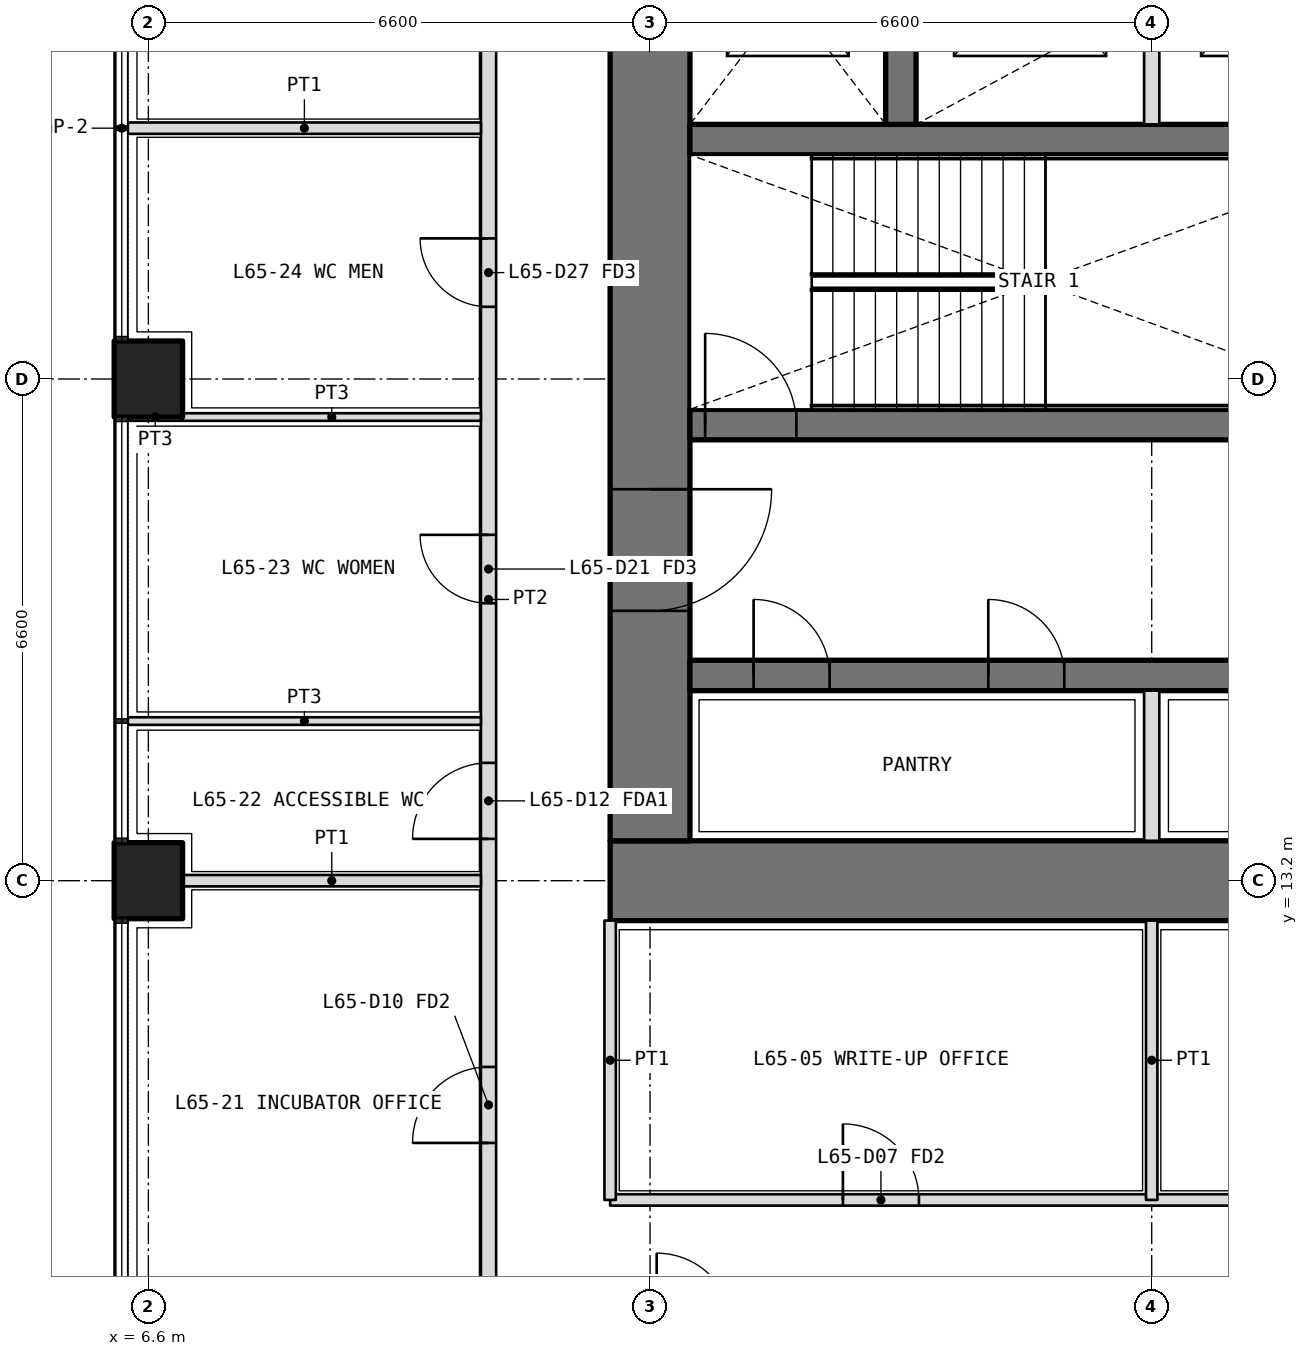
"""IFC4 building model, lengths in metres.
Left out: names, types, materials, properties, quantities, classifications, styles, units other than length and angle.
Written with IfcOpenShell. Run it as: python <this file> out.ifc"""

import sys

from ifc_helpers import new_model, si_unit, direction, frame, frame_2d, origin, origin_2d, place, context, subcontext, project, spatial, rectangle, extrude, element, fill, save


model = new_model("IFC4")
c1 = context("Model", 3, precision=1e-05, world=origin(), true_north=direction((0.0, 1.0)))
c2 = subcontext(c1, "Body", "Model", "MODEL_VIEW")
j1 = project(units=[si_unit("LENGTHUNIT", "METRE"), si_unit("PLANEANGLEUNIT", "RADIAN")], contexts=[c1])
p1 = place(None, origin())
s1 = spatial("IfcSite", under=j1, at=p1, CompositionType="ELEMENT")
p2 = place(p1, origin())
s2 = spatial("IfcBuilding", under=s1, at=p2, CompositionType="ELEMENT")
p3 = place(p2, frame((0.0, 0.0, 283.8)))
s3 = spatial("IfcBuildingStorey", under=s2, at=p3, CompositionType="ELEMENT", Elevation=283.8)
for number, where, z_axis, x_axis in (
    (1, (6.6, 13.2, 0.0), (0.0, 0.0, 1.0), (0.0, 1.0, 0.0)),
    (2, (6.6, 19.8, 0.0), (0.0, 0.0, 1.0), (0.0, 1.0, 0.0)),
):
    element("IfcColumn", number, at=place(p3, frame(where, z_axis=z_axis, x_axis=x_axis)), inside=s3, PredefinedType="COLUMN", context=c2, shape_type="SweptSolid", body=[
        extrude(rectangle(XDim=1.0, YDim=0.9, at=origin_2d()), origin(), (0.0, 0.0, 1.0), 4.2),
    ])
p4 = place(p3, frame((12.675, 13.2, 0.0), z_axis=(0.0, 0.0, 1.0), x_axis=(1.0, 0.0, 0.0)))
e3 = element("IfcWall", 3, at=p4, inside=s3, PredefinedType="SHEAR", context=c2, shape_type="SweptSolid", body=[
    extrude(rectangle(XDim=27.45, YDim=1.05, at=frame_2d((13.725, 0.0))), origin(), (0.0, 0.0, 1.0), 4.2),
])
p5 = place(p3, frame((13.2, 32.475, 0.0), z_axis=(0.0, 0.0, 1.0), x_axis=(0.0, -1.0, 0.0)))
e4 = element("IfcWall", 4, at=p5, inside=s3, PredefinedType="SHEAR", context=c2, shape_type="SweptSolid", body=[
    extrude(rectangle(XDim=18.75, YDim=1.05, at=frame_2d((9.375, 0.0))), origin(), (0.0, 0.0, 1.0), 4.2),
])
p6 = place(p5, frame((14.125, 0.0, 0.0)))
e5 = element("IfcOpeningElement", 5, at=p6, cuts=e4, PredefinedType="OPENING", context=c2, shape_type="SweptSolid", body=[
    extrude(rectangle(XDim=1.6, YDim=2.1, at=frame_2d((0.8, 1.05))), frame((0.0, 0.535, 0.0), z_axis=(0.0, -1.0, 0.0), x_axis=(1.0, 0.0, 0.0)), (0.0, 0.0, 1.0), 1.07),
])
p7 = place(p5, frame((3.325, 0.0, 0.0)))
e6 = element("IfcOpeningElement", 6, at=p7, cuts=e4, PredefinedType="OPENING", context=c2, shape_type="SweptSolid", body=[
    extrude(rectangle(XDim=1.6, YDim=2.1, at=frame_2d((0.8, 1.05))), frame((0.0, 0.535, 0.0), z_axis=(0.0, -1.0, 0.0), x_axis=(1.0, 0.0, 0.0)), (0.0, 0.0, 1.0), 1.07),
])
p8 = place(p3, frame((13.725, 15.9, 0.0), z_axis=(0.0, 0.0, 1.0), x_axis=(1.0, 0.0, 0.0)))
e7 = element("IfcWall", 7, at=p8, inside=s3, PredefinedType="SHEAR", context=c2, shape_type="SweptSolid", body=[
    extrude(rectangle(XDim=25.35, YDim=0.4, at=frame_2d((12.675, 0.0))), origin(), (0.0, 0.0, 1.0), 4.2),
])
p9 = place(p8, frame((0.837, 0.0, 0.0)))
e8 = element("IfcOpeningElement", 8, at=p9, cuts=e7, PredefinedType="OPENING", context=c2, shape_type="SweptSolid", body=[
    extrude(rectangle(XDim=1.0, YDim=2.1, at=frame_2d((0.5, 1.05))), frame((0.0, 0.21, 0.0), z_axis=(0.0, -1.0, 0.0), x_axis=(1.0, 0.0, 0.0)), (0.0, 0.0, 1.0), 0.42),
])
p10 = place(p8, frame((3.925, 0.0, 0.0)))
e9 = element("IfcOpeningElement", 9, at=p10, cuts=e7, PredefinedType="OPENING", context=c2, shape_type="SweptSolid", body=[
    extrude(rectangle(XDim=1.0, YDim=2.1, at=frame_2d((0.5, 1.05))), frame((0.0, 0.21, 0.0), z_axis=(0.0, -1.0, 0.0), x_axis=(1.0, 0.0, 0.0)), (0.0, 0.0, 1.0), 0.42),
])
p11 = place(p8, frame((7.225, 0.0, 0.0)))
e10 = element("IfcOpeningElement", 10, at=p11, cuts=e7, PredefinedType="OPENING", context=c2, shape_type="SweptSolid", body=[
    extrude(rectangle(XDim=1.0, YDim=2.1, at=frame_2d((0.5, 1.05))), frame((0.0, 0.21, 0.0), z_axis=(0.0, -1.0, 0.0), x_axis=(1.0, 0.0, 0.0)), (0.0, 0.0, 1.0), 0.42),
])
p12 = place(p8, frame((10.525, 0.0, 0.0)))
e11 = element("IfcOpeningElement", 11, at=p12, cuts=e7, PredefinedType="OPENING", context=c2, shape_type="SweptSolid", body=[
    extrude(rectangle(XDim=1.0, YDim=2.1, at=frame_2d((0.5, 1.05))), frame((0.0, 0.21, 0.0), z_axis=(0.0, -1.0, 0.0), x_axis=(1.0, 0.0, 0.0)), (0.0, 0.0, 1.0), 0.42),
])
p13 = place(p8, frame((13.825, 0.0, 0.0)))
e12 = element("IfcOpeningElement", 12, at=p13, cuts=e7, PredefinedType="OPENING", context=c2, shape_type="SweptSolid", body=[
    extrude(rectangle(XDim=1.0, YDim=2.1, at=frame_2d((0.5, 1.05))), frame((0.0, 0.21, 0.0), z_axis=(0.0, -1.0, 0.0), x_axis=(1.0, 0.0, 0.0)), (0.0, 0.0, 1.0), 0.42),
])
p14 = place(p8, frame((17.125, 0.0, 0.0)))
e13 = element("IfcOpeningElement", 13, at=p14, cuts=e7, PredefinedType="OPENING", context=c2, shape_type="SweptSolid", body=[
    extrude(rectangle(XDim=1.0, YDim=2.1, at=frame_2d((0.5, 1.05))), frame((0.0, 0.21, 0.0), z_axis=(0.0, -1.0, 0.0), x_axis=(1.0, 0.0, 0.0)), (0.0, 0.0, 1.0), 0.42),
])
p15 = place(p8, frame((20.425, 0.0, 0.0)))
e14 = element("IfcOpeningElement", 14, at=p15, cuts=e7, PredefinedType="OPENING", context=c2, shape_type="SweptSolid", body=[
    extrude(rectangle(XDim=1.0, YDim=2.1, at=frame_2d((0.5, 1.05))), frame((0.0, 0.21, 0.0), z_axis=(0.0, -1.0, 0.0), x_axis=(1.0, 0.0, 0.0)), (0.0, 0.0, 1.0), 0.42),
])
p16 = place(p8, frame((23.512, 0.0, 0.0)))
e15 = element("IfcOpeningElement", 15, at=p16, cuts=e7, PredefinedType="OPENING", context=c2, shape_type="SweptSolid", body=[
    extrude(rectangle(XDim=1.0, YDim=2.1, at=frame_2d((0.5, 1.05))), frame((0.0, 0.21, 0.0), z_axis=(0.0, -1.0, 0.0), x_axis=(1.0, 0.0, 0.0)), (0.0, 0.0, 1.0), 0.42),
])
p17 = place(p3, frame((13.725, 19.2, 0.0), z_axis=(0.0, 0.0, 1.0), x_axis=(1.0, 0.0, 0.0)))
e16 = element("IfcWall", 16, at=p17, inside=s3, PredefinedType="SHEAR", context=c2, shape_type="SweptSolid", body=[
    extrude(rectangle(XDim=25.35, YDim=0.4, at=frame_2d((12.675, 0.0))), origin(), (0.0, 0.0, 1.0), 4.2),
])
p18 = place(p17, frame((10.575, 0.0, 0.0)))
e17 = element("IfcOpeningElement", 17, at=p18, cuts=e16, PredefinedType="OPENING", context=c2, shape_type="SweptSolid", body=[
    extrude(rectangle(XDim=0.9, YDim=2.1, at=frame_2d((0.45, 1.05))), frame((0.0, 0.21, 0.0), z_axis=(0.0, -1.0, 0.0), x_axis=(1.0, 0.0, 0.0)), (0.0, 0.0, 1.0), 0.42),
])
p19 = place(p17, frame((13.875, 0.0, 0.0)))
e18 = element("IfcOpeningElement", 18, at=p19, cuts=e16, PredefinedType="OPENING", context=c2, shape_type="SweptSolid", body=[
    extrude(rectangle(XDim=0.9, YDim=2.1, at=frame_2d((0.45, 1.05))), frame((0.0, 0.21, 0.0), z_axis=(0.0, -1.0, 0.0), x_axis=(1.0, 0.0, 0.0)), (0.0, 0.0, 1.0), 0.42),
])
p20 = place(p17, frame((0.2, 0.0, 0.0)))
e19 = element("IfcOpeningElement", 19, at=p20, cuts=e16, PredefinedType="OPENING", context=c2, shape_type="SweptSolid", body=[
    extrude(rectangle(XDim=1.2, YDim=2.1, at=frame_2d((0.6, 1.05))), frame((0.0, 0.21, 0.0), z_axis=(0.0, -1.0, 0.0), x_axis=(1.0, 0.0, 0.0)), (0.0, 0.0, 1.0), 0.42),
])
p21 = place(p17, frame((23.512, 0.0, 0.0)))
e20 = element("IfcOpeningElement", 20, at=p21, cuts=e16, PredefinedType="OPENING", context=c2, shape_type="SweptSolid", body=[
    extrude(rectangle(XDim=1.1, YDim=2.1, at=frame_2d((0.55, 1.05))), frame((0.0, 0.21, 0.0), z_axis=(0.0, -1.0, 0.0), x_axis=(1.0, 0.0, 0.0)), (0.0, 0.0, 1.0), 0.42),
])
p22 = place(p17, frame((17.125, 0.0, 0.0)))
e21 = element("IfcOpeningElement", 21, at=p22, cuts=e16, PredefinedType="OPENING", context=c2, shape_type="SweptSolid", body=[
    extrude(rectangle(XDim=1.1, YDim=2.1, at=frame_2d((0.55, 1.05))), frame((0.0, 0.21, 0.0), z_axis=(0.0, -1.0, 0.0), x_axis=(1.0, 0.0, 0.0)), (0.0, 0.0, 1.0), 0.42),
])
p23 = place(p17, frame((20.325, 0.0, 0.0)))
e22 = element("IfcOpeningElement", 22, at=p23, cuts=e16, PredefinedType="OPENING", context=c2, shape_type="SweptSolid", body=[
    extrude(rectangle(XDim=1.1, YDim=2.1, at=frame_2d((0.55, 1.05))), frame((0.0, 0.21, 0.0), z_axis=(0.0, -1.0, 0.0), x_axis=(1.0, 0.0, 0.0)), (0.0, 0.0, 1.0), 0.42),
])
p24 = place(p3, frame((13.725, 22.95, 0.0), z_axis=(0.0, 0.0, 1.0), x_axis=(1.0, 0.0, 0.0)))
e23 = element("IfcWall", 23, at=p24, inside=s3, PredefinedType="SHEAR", context=c2, shape_type="SweptSolid", body=[
    extrude(rectangle(XDim=25.35, YDim=0.4, at=frame_2d((12.675, 0.0))), origin(), (0.0, 0.0, 1.0), 4.2),
])
p25 = place(p3, frame((16.5, 23.15, 0.0), z_axis=(0.0, 0.0, 1.0), x_axis=(0.0, 1.0, 0.0)))
e24 = element("IfcWall", 24, at=p25, inside=s3, PredefinedType="SHEAR", context=c2, shape_type="SweptSolid", body=[
    extrude(rectangle(XDim=3.35, YDim=0.4, at=frame_2d((1.675, 0.0))), origin(), (0.0, 0.0, 1.0), 4.2),
])
p26 = place(p3, frame((19.8, 13.725, 0.0), z_axis=(0.0, 0.0, 1.0), x_axis=(0.0, 1.0, 0.0)))
e25 = element("IfcWall", 25, at=p26, inside=s3, PredefinedType="PARTITIONING", context=c2, shape_type="SweptSolid", body=[
    extrude(rectangle(XDim=1.975, YDim=0.2, at=frame_2d((0.987, 0.0))), origin(), (0.0, 0.0, 1.0), 4.2),
])
p27 = place(p3, frame((19.8, 23.15, 0.0), z_axis=(0.0, 0.0, 1.0), x_axis=(0.0, 1.0, 0.0)))
e26 = element("IfcWall", 26, at=p27, inside=s3, PredefinedType="PARTITIONING", context=c2, shape_type="SweptSolid", body=[
    extrude(rectangle(XDim=3.35, YDim=0.2, at=frame_2d((1.675, 0.0))), origin(), (0.0, 0.0, 1.0), 4.2),
])
p28 = place(p3, frame((12.675, 9.0, 0.0), z_axis=(0.0, 0.0, 1.0), x_axis=(1.0, 0.0, 0.0)))
e27 = element("IfcWall", 27, at=p28, inside=s3, PredefinedType="PARTITIONING", context=c2, shape_type="SweptSolid", body=[
    extrude(rectangle(XDim=27.45, YDim=0.15, at=frame_2d((13.725, 0.0))), origin(), (0.0, 0.0, 1.0), 3.0),
])
p29 = place(p28, frame((3.062, 0.0, 0.0)))
e28 = element("IfcOpeningElement", 28, at=p29, cuts=e27, PredefinedType="OPENING", context=c2, shape_type="SweptSolid", body=[
    extrude(rectangle(XDim=1.0, YDim=2.1, at=frame_2d((0.5, 1.05))), frame((0.0, 0.085, 0.0), z_axis=(0.0, -1.0, 0.0), x_axis=(1.0, 0.0, 0.0)), (0.0, 0.0, 1.0), 0.17),
])
p30 = place(p28, frame((13.225, 0.0, 0.0)))
e29 = element("IfcOpeningElement", 29, at=p30, cuts=e27, PredefinedType="OPENING", context=c2, shape_type="SweptSolid", body=[
    extrude(rectangle(XDim=1.0, YDim=2.1, at=frame_2d((0.5, 1.05))), frame((0.0, 0.085, 0.0), z_axis=(0.0, -1.0, 0.0), x_axis=(1.0, 0.0, 0.0)), (0.0, 0.0, 1.0), 0.17),
])
p31 = place(p28, frame((23.387, 0.0, 0.0)))
e30 = element("IfcOpeningElement", 30, at=p31, cuts=e27, PredefinedType="OPENING", context=c2, shape_type="SweptSolid", body=[
    extrude(rectangle(XDim=1.0, YDim=2.1, at=frame_2d((0.5, 1.05))), frame((0.0, 0.085, 0.0), z_axis=(0.0, -1.0, 0.0), x_axis=(1.0, 0.0, 0.0)), (0.0, 0.0, 1.0), 0.17),
])
for number, where, z_axis, x_axis in (
    (31, (12.675, 12.675, 0.0), (0.0, 0.0, 1.0), (0.0, -1.0, 0.0)),
    (32, (19.8, 12.675, 0.0), (0.0, 0.0, 1.0), (0.0, -1.0, 0.0)),
):
    element("IfcWall", number, at=place(p3, frame(where, z_axis=z_axis, x_axis=x_axis)), inside=s3, PredefinedType="PARTITIONING", context=c2, shape_type="SweptSolid", body=[
        extrude(rectangle(XDim=3.675, YDim=0.15, at=frame_2d((1.837, 0.0))), origin(), (0.0, 0.0, 1.0), 3.0),
    ])
p32 = place(p3, frame((11.075, 7.4, 0.0), z_axis=(0.0, 0.0, 1.0), x_axis=(0.0, 1.0, 0.0)))
e33 = element("IfcWall", 33, at=p32, inside=s3, PredefinedType="PARTITIONING", context=c2, shape_type="SweptSolid", body=[
    extrude(rectangle(XDim=19.0, YDim=0.2, at=frame_2d((9.5, 0.0))), origin(), (0.0, 0.0, 1.0), 3.0),
])
p33 = place(p32, frame((2.35, 0.0, 0.0)))
e34 = element("IfcOpeningElement", 34, at=p33, cuts=e33, PredefinedType="OPENING", context=c2, shape_type="SweptSolid", body=[
    extrude(rectangle(XDim=1.0, YDim=2.1, at=frame_2d((0.5, 1.05))), frame((0.0, 0.11, 0.0), z_axis=(0.0, -1.0, 0.0), x_axis=(1.0, 0.0, 0.0)), (0.0, 0.0, 1.0), 0.22),
])
p34 = place(p32, frame((6.35, 0.0, 0.0)))
e35 = element("IfcOpeningElement", 35, at=p34, cuts=e33, PredefinedType="OPENING", context=c2, shape_type="SweptSolid", body=[
    extrude(rectangle(XDim=1.0, YDim=2.1, at=frame_2d((0.5, 1.05))), frame((0.0, 0.11, 0.0), z_axis=(0.0, -1.0, 0.0), x_axis=(1.0, 0.0, 0.0)), (0.0, 0.0, 1.0), 0.22),
])
p35 = place(p32, frame((9.45, 0.0, 0.0)))
e36 = element("IfcOpeningElement", 36, at=p35, cuts=e33, PredefinedType="OPENING", context=c2, shape_type="SweptSolid", body=[
    extrude(rectangle(XDim=0.9, YDim=2.1, at=frame_2d((0.45, 1.05))), frame((0.0, 0.11, 0.0), z_axis=(0.0, -1.0, 0.0), x_axis=(1.0, 0.0, 0.0)), (0.0, 0.0, 1.0), 0.22),
])
p36 = place(p32, frame((13.35, 0.0, 0.0)))
e37 = element("IfcOpeningElement", 37, at=p36, cuts=e33, PredefinedType="OPENING", context=c2, shape_type="SweptSolid", body=[
    extrude(rectangle(XDim=0.9, YDim=2.1, at=frame_2d((0.45, 1.05))), frame((0.0, 0.11, 0.0), z_axis=(0.0, -1.0, 0.0), x_axis=(1.0, 0.0, 0.0)), (0.0, 0.0, 1.0), 0.22),
])
p37 = place(p32, frame((16.85, 0.0, 0.0)))
e38 = element("IfcOpeningElement", 38, at=p37, cuts=e33, PredefinedType="OPENING", context=c2, shape_type="SweptSolid", body=[
    extrude(rectangle(XDim=1.0, YDim=2.1, at=frame_2d((0.5, 1.05))), frame((0.0, 0.11, 0.0), z_axis=(0.0, -1.0, 0.0), x_axis=(1.0, 0.0, 0.0)), (0.0, 0.0, 1.0), 0.22),
])
p38 = place(p3, frame((6.33, 15.3, 0.0), z_axis=(0.0, 0.0, 1.0), x_axis=(1.0, 0.0, 0.0)))
e39 = element("IfcWall", 39, at=p38, inside=s3, PredefinedType="PARTITIONING", context=c2, shape_type="SweptSolid", body=[
    extrude(rectangle(XDim=4.645, YDim=0.1, at=frame_2d((2.323, 0.0))), origin(), (0.0, 0.0, 1.0), 2.7),
])
p39 = place(p3, frame((6.33, 19.3, 0.0), z_axis=(0.0, 0.0, 1.0), x_axis=(1.0, 0.0, 0.0)))
e40 = element("IfcWall", 40, at=p39, inside=s3, PredefinedType="PARTITIONING", context=c2, shape_type="SweptSolid", body=[
    extrude(rectangle(XDim=0.72, YDim=0.1, at=frame_2d((0.36, 0.0))), origin(), (0.0, 0.0, 1.0), 2.7),
])
p40 = place(p3, frame((7.05, 19.3, 0.0), z_axis=(0.0, 0.0, 1.0), x_axis=(1.0, 0.0, 0.0)))
e41 = element("IfcWall", 41, at=p40, inside=s3, PredefinedType="PARTITIONING", context=c2, shape_type="SweptSolid", body=[
    extrude(rectangle(XDim=3.925, YDim=0.1, at=frame_2d((1.962, 0.0))), origin(), (0.0, 0.0, 1.0), 3.0),
])
p41 = place(p3, frame((6.33, 23.1, 0.0), z_axis=(0.0, 0.0, 1.0), x_axis=(1.0, 0.0, 0.0)))
e42 = element("IfcWall", 42, at=p41, inside=s3, PredefinedType="PARTITIONING", context=c2, shape_type="SweptSolid", body=[
    extrude(rectangle(XDim=4.645, YDim=0.15, at=frame_2d((2.323, 0.0))), origin(), (0.0, 0.0, 1.0), 2.7),
])
p42 = place(p3, frame((7.05, 13.2, 0.0), z_axis=(0.0, 0.0, 1.0), x_axis=(1.0, 0.0, 0.0)))
e43 = element("IfcWall", 43, at=p42, inside=s3, PredefinedType="PARTITIONING", context=c2, shape_type="SweptSolid", body=[
    extrude(rectangle(XDim=3.925, YDim=0.15, at=frame_2d((1.962, 0.0))), origin(), (0.0, 0.0, 1.0), 3.0),
])
p43 = place(p29, origin())
e44 = element("IfcDoor", 44, at=p43, inside=s3, OperationType="SINGLE_SWING_LEFT", PredefinedType="DOOR", context=c2, shape_type="SweptSolid", body=[
    extrude(rectangle(XDim=1.0, YDim=2.1, at=frame_2d((0.5, 1.05))), frame((0.0, 0.025, 0.0), z_axis=(0.0, -1.0, 0.0), x_axis=(1.0, 0.0, 0.0)), (0.0, 0.0, 1.0), 0.05),
])
fill(e28, e44)
p44 = place(p33, origin())
e45 = element("IfcDoor", 45, at=p44, inside=s3, OperationType="SINGLE_SWING_LEFT", PredefinedType="DOOR", context=c2, shape_type="SweptSolid", body=[
    extrude(rectangle(XDim=1.0, YDim=2.1, at=frame_2d((0.5, 1.05))), frame((0.0, 0.025, 0.0), z_axis=(0.0, -1.0, 0.0), x_axis=(1.0, 0.0, 0.0)), (0.0, 0.0, 1.0), 0.05),
])
fill(e34, e45)
p45 = place(p34, origin())
e46 = element("IfcDoor", 46, at=p45, inside=s3, OperationType="SINGLE_SWING_LEFT", PredefinedType="DOOR", context=c2, shape_type="SweptSolid", body=[
    extrude(rectangle(XDim=1.0, YDim=2.1, at=frame_2d((0.5, 1.05))), frame((0.0, 0.025, 0.0), z_axis=(0.0, -1.0, 0.0), x_axis=(1.0, 0.0, 0.0)), (0.0, 0.0, 1.0), 0.05),
])
fill(e35, e46)
p46 = place(p35, origin())
e47 = element("IfcDoor", 47, at=p46, inside=s3, OperationType="SINGLE_SWING_RIGHT", PredefinedType="DOOR", context=c2, shape_type="SweptSolid", body=[
    extrude(rectangle(XDim=0.9, YDim=2.1, at=frame_2d((0.45, 1.05))), frame((0.0, 0.025, 0.0), z_axis=(0.0, -1.0, 0.0), x_axis=(1.0, 0.0, 0.0)), (0.0, 0.0, 1.0), 0.05),
])
fill(e36, e47)
p47 = place(p36, origin())
e48 = element("IfcDoor", 48, at=p47, inside=s3, OperationType="SINGLE_SWING_RIGHT", PredefinedType="DOOR", context=c2, shape_type="SweptSolid", body=[
    extrude(rectangle(XDim=0.9, YDim=2.1, at=frame_2d((0.45, 1.05))), frame((0.0, 0.025, 0.0), z_axis=(0.0, -1.0, 0.0), x_axis=(1.0, 0.0, 0.0)), (0.0, 0.0, 1.0), 0.05),
])
fill(e37, e48)
p48 = place(p9, origin())
e49 = element("IfcDoor", 49, at=p48, inside=s3, OperationType="SINGLE_SWING_LEFT", PredefinedType="DOOR", context=c2, shape_type="SweptSolid", body=[
    extrude(rectangle(XDim=1.0, YDim=2.1, at=frame_2d((0.5, 1.05))), frame((0.0, 0.025, 0.0), z_axis=(0.0, -1.0, 0.0), x_axis=(1.0, 0.0, 0.0)), (0.0, 0.0, 1.0), 0.05),
])
fill(e8, e49)
p49 = place(p10, origin())
e50 = element("IfcDoor", 50, at=p49, inside=s3, OperationType="SINGLE_SWING_LEFT", PredefinedType="DOOR", context=c2, shape_type="SweptSolid", body=[
    extrude(rectangle(XDim=1.0, YDim=2.1, at=frame_2d((0.5, 1.05))), frame((0.0, 0.025, 0.0), z_axis=(0.0, -1.0, 0.0), x_axis=(1.0, 0.0, 0.0)), (0.0, 0.0, 1.0), 0.05),
])
fill(e9, e50)
p50 = place(p20, origin())
e51 = element("IfcDoor", 51, at=p50, inside=s3, OperationType="SINGLE_SWING_LEFT", PredefinedType="DOOR", context=c2, shape_type="SweptSolid", body=[
    extrude(rectangle(XDim=1.2, YDim=2.1, at=frame_2d((0.6, 1.05))), frame((0.0, 0.025, 0.0), z_axis=(0.0, -1.0, 0.0), x_axis=(1.0, 0.0, 0.0)), (0.0, 0.0, 1.0), 0.05),
])
fill(e19, e51)
p51 = place(p6, origin())
e52 = element("IfcDoor", 52, at=p51, inside=s3, OperationType="DOUBLE_DOOR_DOUBLE_SWING", PredefinedType="DOOR", context=c2, shape_type="SweptSolid", body=[
    extrude(rectangle(XDim=1.6, YDim=2.1, at=frame_2d((0.8, 1.05))), frame((0.0, 0.025, 0.0), z_axis=(0.0, -1.0, 0.0), x_axis=(1.0, 0.0, 0.0)), (0.0, 0.0, 1.0), 0.05),
])
fill(e5, e52)
save(model, sys.argv[1])
